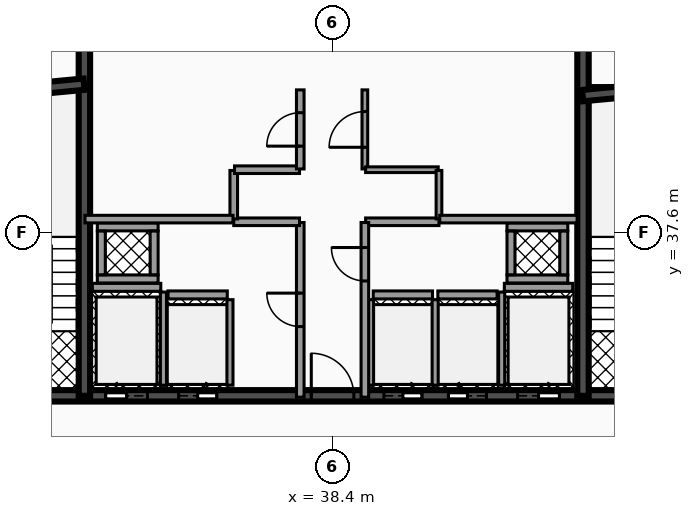
"""IFC4 building model, lengths in metres.
Left out: names, types, materials, properties, quantities, classifications, styles, units other than length and angle.
Written with IfcOpenShell. Run it as: python <this file> out.ifc"""

import sys

from ifc_helpers import new_model, si_unit, direction, frame, frame_2d, origin, place, context, subcontext, project, spatial, rectangle, extrude, element, fill, save


model = new_model("IFC4")
c1 = context("Model", 3, precision=1e-05, world=origin(), true_north=direction((0.0, 1.0)))
c2 = subcontext(c1, "Body", "Model", "MODEL_VIEW")
j1 = project(units=[si_unit("LENGTHUNIT", "METRE"), si_unit("PLANEANGLEUNIT", "RADIAN")], contexts=[c1])
p1 = place(None, origin())
s1 = spatial("IfcSite", under=j1, at=p1, CompositionType="ELEMENT")
p2 = place(p1, origin())
s2 = spatial("IfcBuilding", under=s1, at=p2, CompositionType="ELEMENT")
p3 = place(p2, frame((0.0, 0.0, 229.16)))
s3 = spatial("IfcBuildingStorey", under=s2, at=p3, CompositionType="ELEMENT", Elevation=229.16)
p4 = place(p3, frame((28.5, 33.3, 0.0), z_axis=(0.0, 0.0, 1.0), x_axis=(1.0, 0.0, 0.0)))
e1 = element("IfcWall", 1, at=p4, inside=s3, PredefinedType="SHEAR", context=c2, shape_type="SweptSolid", body=[
    extrude(rectangle(XDim=19.86, YDim=0.3, at=frame_2d((9.93, 0.0))), origin(), (0.0, 0.0, 1.0), 3.18),
])
p5 = place(p4, frame((3.93, 0.0, 0.0)))
e2 = element("IfcOpeningElement", 2, at=p5, cuts=e1, PredefinedType="OPENING", context=c2, shape_type="SweptSolid", body=[
    extrude(rectangle(XDim=1.1, YDim=2.15, at=frame_2d((0.55, 1.075))), frame((0.0, 0.16, 0.0), z_axis=(0.0, -1.0, 0.0), x_axis=(1.0, 0.0, 0.0)), (0.0, 0.0, 1.0), 0.32),
])
p6 = place(p4, frame((14.77, 0.0, 0.0)))
e3 = element("IfcOpeningElement", 3, at=p6, cuts=e1, PredefinedType="OPENING", context=c2, shape_type="SweptSolid", body=[
    extrude(rectangle(XDim=1.1, YDim=2.15, at=frame_2d((0.55, 1.075))), frame((0.0, 0.16, 0.0), z_axis=(0.0, -1.0, 0.0), x_axis=(1.0, 0.0, 0.0)), (0.0, 0.0, 1.0), 0.32),
])
p7 = place(p4, frame((11.25, 0.0, 0.0)))
e4 = element("IfcOpeningElement", 4, at=p7, cuts=e1, PredefinedType="OPENING", context=c2, shape_type="SweptSolid", body=[
    extrude(rectangle(XDim=1.0, YDim=2.1, at=frame_2d((0.5, 1.05))), frame((0.0, 0.16, 0.0), z_axis=(0.0, -1.0, 0.0), x_axis=(1.0, 0.0, 0.0)), (0.0, 0.0, 1.0), 0.32),
])
p8 = place(p4, frame((12.95, 0.0, 0.0)))
e5 = element("IfcOpeningElement", 5, at=p8, cuts=e1, PredefinedType="OPENING", context=c2, shape_type="SweptSolid", body=[
    extrude(rectangle(XDim=1.0, YDim=2.1, at=frame_2d((0.5, 1.05))), frame((0.0, 0.16, 0.0), z_axis=(0.0, -1.0, 0.0), x_axis=(1.0, 0.0, 0.0)), (0.0, 0.0, 1.0), 0.32),
])
p9 = place(p4, frame((5.85, 0.0, 0.0)))
e6 = element("IfcOpeningElement", 6, at=p9, cuts=e1, PredefinedType="OPENING", context=c2, shape_type="SweptSolid", body=[
    extrude(rectangle(XDim=1.0, YDim=2.1, at=frame_2d((0.5, 1.05))), frame((0.0, 0.16, 0.0), z_axis=(0.0, -1.0, 0.0), x_axis=(1.0, 0.0, 0.0)), (0.0, 0.0, 1.0), 0.32),
])
p10 = place(p4, frame((1.21, 0.0, 0.0)))
e7 = element("IfcOpeningElement", 7, at=p10, cuts=e1, PredefinedType="OPENING", context=c2, shape_type="SweptSolid", body=[
    extrude(rectangle(XDim=1.1, YDim=2.2, at=frame_2d((0.55, 1.1))), frame((0.0, 0.16, 0.0), z_axis=(0.0, -1.0, 0.0), x_axis=(1.0, 0.0, 0.0)), (0.0, 0.0, 1.0), 0.32),
])
p11 = place(p4, frame((9.34, 0.0, 0.0)))
e8 = element("IfcOpeningElement", 8, at=p11, cuts=e1, PredefinedType="OPENING", context=c2, shape_type="SweptSolid", body=[
    extrude(rectangle(XDim=1.12, YDim=2.05, at=frame_2d((0.56, 1.025))), frame((0.0, 0.16, 0.0), z_axis=(0.0, -1.0, 0.0), x_axis=(1.0, 0.0, 0.0)), (0.0, 0.0, 1.0), 0.32),
])
p12 = place(p4, frame((17.55, 0.0, 0.0)))
e9 = element("IfcOpeningElement", 9, at=p12, cuts=e1, PredefinedType="OPENING", context=c2, shape_type="SweptSolid", body=[
    extrude(rectangle(XDim=1.1, YDim=2.2, at=frame_2d((0.55, 1.1))), frame((0.0, 0.16, 0.0), z_axis=(0.0, -1.0, 0.0), x_axis=(1.0, 0.0, 0.0)), (0.0, 0.0, 1.0), 0.32),
])
for number, where, z_axis, x_axis in (
    (10, (31.87, 33.3, 0.0), (0.0, 0.0, 1.0), (0.0, 1.0, 0.0)),
    (11, (44.99, 33.3, 0.0), (0.0, 0.0, 1.0), (0.0, 1.0, 0.0)),
):
    element("IfcWall", number, at=place(p3, frame(where, z_axis=z_axis, x_axis=x_axis)), inside=s3, PredefinedType="SHEAR", context=c2, shape_type="SweptSolid", body=[
        extrude(rectangle(XDim=10.1, YDim=0.3, at=frame_2d((5.05, 0.0))), origin(), (0.0, 0.0, 1.0), 3.18),
    ])
p13 = place(p3, frame((28.64, 41.2, 0.0), z_axis=(0.0, 0.0, 1.0), x_axis=(0.995687118776, 0.092774789157, 0.0)))
e12 = element("IfcWall", 12, at=p13, inside=s3, PredefinedType="SHEAR", context=c2, shape_type="SweptSolid", body=[
    extrude(rectangle(XDim=3.234, YDim=0.3, at=frame_2d((1.617, 0.0))), origin(), (0.0, 0.0, 1.0), 3.18),
])
p14 = place(p3, frame((44.98, 41.2, 0.0), z_axis=(0.0, 0.0, 1.0), x_axis=(0.995686468965, 0.09278176286, 0.0)))
e13 = element("IfcWall", 13, at=p14, inside=s3, PredefinedType="SHEAR", context=c2, shape_type="SweptSolid", body=[
    extrude(rectangle(XDim=3.234, YDim=0.3, at=frame_2d((1.617, 0.0))), origin(), (0.0, 0.0, 1.0), 3.18),
])
p15 = place(p3, frame((32.08, 36.155, 0.0), z_axis=(0.0, 0.0, 1.0), x_axis=(1.0, 0.0, 0.0)))
e14 = element("IfcWall", 14, at=p15, inside=s3, PredefinedType="SOLIDWALL", context=c2, shape_type="SweptSolid", body=[
    extrude(rectangle(XDim=1.8, YDim=0.21, at=frame_2d((0.9, 0.0))), origin(), (0.0, 0.0, 1.0), 3.18),
])
p16 = place(p3, frame((33.95, 33.58, 0.0), z_axis=(0.0, 0.0, 1.0), x_axis=(0.0, 1.0, 0.0)))
e15 = element("IfcWall", 15, at=p16, inside=s3, PredefinedType="SOLIDWALL", context=c2, shape_type="SweptSolid", body=[
    extrude(rectangle(XDim=2.45, YDim=0.16, at=frame_2d((1.225, 0.0))), origin(), (0.0, 0.0, 1.0), 3.18),
])
p17 = place(p3, frame((42.92, 36.155, 0.0), z_axis=(0.0, 0.0, 1.0), x_axis=(1.0, 0.0, 0.0)))
e16 = element("IfcWall", 16, at=p17, inside=s3, PredefinedType="SOLIDWALL", context=c2, shape_type="SweptSolid", body=[
    extrude(rectangle(XDim=1.8, YDim=0.21, at=frame_2d((0.9, 0.0))), origin(), (0.0, 0.0, 1.0), 3.18),
])
p18 = place(p3, frame((42.85, 33.58, 0.0), z_axis=(0.0, 0.0, 1.0), x_axis=(0.0, 1.0, 0.0)))
e17 = element("IfcWall", 17, at=p18, inside=s3, PredefinedType="SOLIDWALL", context=c2, shape_type="SweptSolid", body=[
    extrude(rectangle(XDim=2.45, YDim=0.16, at=frame_2d((1.225, 0.0))), origin(), (0.0, 0.0, 1.0), 3.18),
])
p19 = place(p3, frame((39.47, 35.955, 0.0), z_axis=(0.0, 0.0, 1.0), x_axis=(1.0, 0.0, 0.0)))
e18 = element("IfcWall", 18, at=p19, inside=s3, PredefinedType="SOLIDWALL", context=c2, shape_type="SweptSolid", body=[
    extrude(rectangle(XDim=1.56, YDim=0.21, at=frame_2d((0.78, 0.0))), origin(), (0.0, 0.0, 1.0), 3.18),
])
for number, where, z_axis, x_axis in (
    (19, (39.4, 33.58, 0.0), (0.0, 0.0, 1.0), (0.0, 1.0, 0.0)),
    (20, (41.1, 33.58, 0.0), (0.0, 0.0, 1.0), (0.0, 1.0, 0.0)),
):
    element("IfcWall", number, at=place(p3, frame(where, z_axis=z_axis, x_axis=x_axis)), inside=s3, PredefinedType="SOLIDWALL", context=c2, shape_type="SweptSolid", body=[
        extrude(rectangle(XDim=2.25, YDim=0.16, at=frame_2d((1.125, 0.0))), origin(), (0.0, 0.0, 1.0), 3.18),
    ])
p20 = place(p3, frame((41.17, 35.955, 0.0), z_axis=(0.0, 0.0, 1.0), x_axis=(1.0, 0.0, 0.0)))
e21 = element("IfcWall", 21, at=p20, inside=s3, PredefinedType="SOLIDWALL", context=c2, shape_type="SweptSolid", body=[
    extrude(rectangle(XDim=1.56, YDim=0.21, at=frame_2d((0.78, 0.0))), origin(), (0.0, 0.0, 1.0), 3.18),
])
p21 = place(p3, frame((34.07, 35.955, 0.0), z_axis=(0.0, 0.0, 1.0), x_axis=(1.0, 0.0, 0.0)))
e22 = element("IfcWall", 22, at=p21, inside=s3, PredefinedType="SOLIDWALL", context=c2, shape_type="SweptSolid", body=[
    extrude(rectangle(XDim=1.56, YDim=0.21, at=frame_2d((0.78, 0.0))), origin(), (0.0, 0.0, 1.0), 3.18),
])
p22 = place(p3, frame((35.7, 33.58, 0.0), z_axis=(0.0, 0.0, 1.0), x_axis=(0.0, 1.0, 0.0)))
e23 = element("IfcWall", 23, at=p22, inside=s3, PredefinedType="SOLIDWALL", context=c2, shape_type="SweptSolid", body=[
    extrude(rectangle(XDim=2.25, YDim=0.16, at=frame_2d((1.125, 0.0))), origin(), (0.0, 0.0, 1.0), 3.18),
])
for number, where, z_axis, x_axis in (
    (24, (32.21, 36.375, 0.0), (0.0, 0.0, 1.0), (1.0, 0.0, 0.0)),
    (25, (32.21, 37.745, 0.0), (0.0, 0.0, 1.0), (1.0, 0.0, 0.0)),
):
    element("IfcWall", number, at=place(p3, frame(where, z_axis=z_axis, x_axis=x_axis)), inside=s3, PredefinedType="SOLIDWALL", context=c2, shape_type="SweptSolid", body=[
        extrude(rectangle(XDim=1.6, YDim=0.21, at=frame_2d((0.8, 0.0))), origin(), (0.0, 0.0, 1.0), 3.18),
    ])
for number, where, z_axis, x_axis in (
    (26, (32.315, 36.485, 0.0), (0.0, 0.0, 1.0), (0.0, 1.0, 0.0)),
    (27, (33.705, 36.485, 0.0), (0.0, 0.0, 1.0), (0.0, 1.0, 0.0)),
):
    element("IfcWall", number, at=place(p3, frame(where, z_axis=z_axis, x_axis=x_axis)), inside=s3, PredefinedType="SOLIDWALL", context=c2, shape_type="SweptSolid", body=[
        extrude(rectangle(XDim=1.15, YDim=0.21, at=frame_2d((0.575, 0.0))), origin(), (0.0, 0.0, 1.0), 3.18),
    ])
for number, where, z_axis, x_axis in (
    (28, (42.99, 36.375, 0.0), (0.0, 0.0, 1.0), (1.0, 0.0, 0.0)),
    (29, (42.99, 37.745, 0.0), (0.0, 0.0, 1.0), (1.0, 0.0, 0.0)),
):
    element("IfcWall", number, at=place(p3, frame(where, z_axis=z_axis, x_axis=x_axis)), inside=s3, PredefinedType="SOLIDWALL", context=c2, shape_type="SweptSolid", body=[
        extrude(rectangle(XDim=1.6, YDim=0.21, at=frame_2d((0.8, 0.0))), origin(), (0.0, 0.0, 1.0), 3.18),
    ])
for number, where, z_axis, x_axis in (
    (30, (43.095, 36.485, 0.0), (0.0, 0.0, 1.0), (0.0, 1.0, 0.0)),
    (31, (44.485, 36.485, 0.0), (0.0, 0.0, 1.0), (0.0, 1.0, 0.0)),
):
    element("IfcWall", number, at=place(p3, frame(where, z_axis=z_axis, x_axis=x_axis)), inside=s3, PredefinedType="SOLIDWALL", context=c2, shape_type="SweptSolid", body=[
        extrude(rectangle(XDim=1.15, YDim=0.21, at=frame_2d((0.575, 0.0))), origin(), (0.0, 0.0, 1.0), 3.18),
    ])
p23 = place(p3, frame((37.55, 33.265, 0.0), z_axis=(0.0, 0.0, 1.0), x_axis=(0.0, 1.0, 0.0)))
e32 = element("IfcWall", 32, at=p23, inside=s3, PredefinedType="PARTITIONING", context=c2, shape_type="SweptSolid", body=[
    extrude(rectangle(XDim=4.595, YDim=0.2, at=frame_2d((2.298, 0.0))), origin(), (0.0, 0.0, 1.0), 2.235),
])
p24 = place(p23, frame((1.857, 0.0, 0.0)))
e33 = element("IfcOpeningElement", 33, at=p24, cuts=e32, PredefinedType="OPENING", context=c2, shape_type="SweptSolid", body=[
    extrude(rectangle(XDim=0.88, YDim=2.05, at=frame_2d((0.44, 1.025))), frame((0.0, 0.11, 0.0), z_axis=(0.0, -1.0, 0.0), x_axis=(1.0, 0.0, 0.0)), (0.0, 0.0, 1.0), 0.22),
])
p25 = place(p3, frame((35.8, 37.88, 0.0), z_axis=(0.0, 0.0, 1.0), x_axis=(1.0, 0.0, 0.0)))
e34 = element("IfcWall", 34, at=p25, inside=s3, PredefinedType="PARTITIONING", context=c2, shape_type="SweptSolid", body=[
    extrude(rectangle(XDim=1.73, YDim=0.2, at=frame_2d((0.865, 0.0))), origin(), (0.0, 0.0, 1.0), 2.235),
])
p26 = place(p3, frame((35.8, 37.955, 0.0), z_axis=(0.0, 0.0, 1.0), x_axis=(0.0, 1.0, 0.0)))
e35 = element("IfcWall", 35, at=p26, inside=s3, PredefinedType="PARTITIONING", context=c2, shape_type="SweptSolid", body=[
    extrude(rectangle(XDim=1.275, YDim=0.2, at=frame_2d((0.637, 0.0))), origin(), (0.0, 0.0, 1.0), 2.235),
])
p27 = place(p3, frame((35.82, 39.25, 0.0), z_axis=(0.0, 0.0, 1.0), x_axis=(1.0, 0.0, 0.0)))
e36 = element("IfcWall", 36, at=p27, inside=s3, PredefinedType="PARTITIONING", context=c2, shape_type="SweptSolid", body=[
    extrude(rectangle(XDim=1.71, YDim=0.2, at=frame_2d((0.855, 0.0))), origin(), (0.0, 0.0, 1.0), 2.235),
])
p28 = place(p3, frame((37.55, 39.27, 0.0), z_axis=(0.0, 0.0, 1.0), x_axis=(0.0, 1.0, 0.0)))
e37 = element("IfcWall", 37, at=p28, inside=s3, PredefinedType="PARTITIONING", context=c2, shape_type="SweptSolid", body=[
    extrude(rectangle(XDim=2.08, YDim=0.2, at=frame_2d((1.04, 0.0))), origin(), (0.0, 0.0, 1.0), 2.235),
])
p29 = place(p28, frame((0.6, 0.0, 0.0)))
e38 = element("IfcOpeningElement", 38, at=p29, cuts=e37, PredefinedType="OPENING", context=c2, shape_type="SweptSolid", body=[
    extrude(rectangle(XDim=0.88, YDim=2.05, at=frame_2d((0.44, 1.025))), frame((0.0, 0.11, 0.0), z_axis=(0.0, -1.0, 0.0), x_axis=(1.0, 0.0, 0.0)), (0.0, 0.0, 1.0), 0.22),
])
p30 = place(p3, frame((39.27, 37.88, 0.0), z_axis=(0.0, 0.0, 1.0), x_axis=(1.0, 0.0, 0.0)))
e39 = element("IfcWall", 39, at=p30, inside=s3, PredefinedType="PARTITIONING", context=c2, shape_type="SweptSolid", body=[
    extrude(rectangle(XDim=1.93, YDim=0.2, at=frame_2d((0.965, 0.0))), origin(), (0.0, 0.0, 1.0), 2.235),
])
p31 = place(p3, frame((39.25, 33.265, 0.0), z_axis=(0.0, 0.0, 1.0), x_axis=(0.0, 1.0, 0.0)))
e40 = element("IfcWall", 40, at=p31, inside=s3, PredefinedType="PARTITIONING", context=c2, shape_type="SweptSolid", body=[
    extrude(rectangle(XDim=4.595, YDim=0.2, at=frame_2d((2.298, 0.0))), origin(), (0.0, 0.0, 1.0), 2.235),
])
p32 = place(p31, frame((3.058, 0.0, 0.0)))
e41 = element("IfcOpeningElement", 41, at=p32, cuts=e40, PredefinedType="OPENING", context=c2, shape_type="SweptSolid", body=[
    extrude(rectangle(XDim=0.88, YDim=2.05, at=frame_2d((0.44, 1.025))), frame((0.0, 0.11, 0.0), z_axis=(0.0, -1.0, 0.0), x_axis=(1.0, 0.0, 0.0)), (0.0, 0.0, 1.0), 0.22),
])
p33 = place(p3, frame((39.25, 39.27, 0.0), z_axis=(0.0, 0.0, 1.0), x_axis=(0.0, 1.0, 0.0)))
e42 = element("IfcWall", 42, at=p33, inside=s3, PredefinedType="PARTITIONING", context=c2, shape_type="SweptSolid", body=[
    extrude(rectangle(XDim=2.08, YDim=0.15, at=frame_2d((1.04, 0.0))), origin(), (0.0, 0.0, 1.0), 2.235),
])
p34 = place(p33, frame((0.57, 0.0, 0.0)))
e43 = element("IfcOpeningElement", 43, at=p34, cuts=e42, PredefinedType="OPENING", context=c2, shape_type="SweptSolid", body=[
    extrude(rectangle(XDim=0.94, YDim=2.05, at=frame_2d((0.47, 1.025))), frame((0.0, 0.085, 0.0), z_axis=(0.0, -1.0, 0.0), x_axis=(1.0, 0.0, 0.0)), (0.0, 0.0, 1.0), 0.17),
])
p35 = place(p3, frame((39.27, 39.25, 0.0), z_axis=(0.0, 0.0, 1.0), x_axis=(1.0, 0.0, 0.0)))
e44 = element("IfcWall", 44, at=p35, inside=s3, PredefinedType="PARTITIONING", context=c2, shape_type="SweptSolid", body=[
    extrude(rectangle(XDim=1.91, YDim=0.15, at=frame_2d((0.955, 0.0))), origin(), (0.0, 0.0, 1.0), 2.235),
])
p36 = place(p3, frame((41.2, 37.955, 0.0), z_axis=(0.0, 0.0, 1.0), x_axis=(0.0, 1.0, 0.0)))
e45 = element("IfcWall", 45, at=p36, inside=s3, PredefinedType="PARTITIONING", context=c2, shape_type="SweptSolid", body=[
    extrude(rectangle(XDim=1.275, YDim=0.15, at=frame_2d((0.637, 0.0))), origin(), (0.0, 0.0, 1.0), 2.235),
])
p37 = place(p3, frame((31.885, 37.95, 0.0), z_axis=(0.0, 0.0, 1.0), x_axis=(1.0, 0.0, 0.0)))
e46 = element("IfcWall", 46, at=p37, inside=s3, PredefinedType="PARTITIONING", context=c2, shape_type="SweptSolid", body=[
    extrude(rectangle(XDim=3.895, YDim=0.2, at=frame_2d((1.948, 0.0))), origin(), (0.0, 0.0, 1.0), 2.235),
])
p38 = place(p3, frame((41.22, 37.95, 0.0), z_axis=(0.0, 0.0, 1.0), x_axis=(1.0, 0.0, 0.0)))
e47 = element("IfcWall", 47, at=p38, inside=s3, PredefinedType="PARTITIONING", context=c2, shape_type="SweptSolid", body=[
    extrude(rectangle(XDim=3.615, YDim=0.2, at=frame_2d((1.808, 0.0))), origin(), (0.0, 0.0, 1.0), 2.235),
])
p39 = place(p5, origin())
e48 = element("IfcDoor", 48, at=p39, inside=s3, OperationType="SLIDING_TO_LEFT", PredefinedType="DOOR", context=c2, shape_type="SweptSolid", body=[
    extrude(rectangle(XDim=1.1, YDim=2.15, at=frame_2d((0.55, 1.075))), frame((0.0, 0.025, 0.0), z_axis=(0.0, -1.0, 0.0), x_axis=(1.0, 0.0, 0.0)), (0.0, 0.0, 1.0), 0.05),
])
fill(e2, e48)
p40 = place(p6, origin())
e49 = element("IfcDoor", 49, at=p40, inside=s3, OperationType="SLIDING_TO_RIGHT", PredefinedType="DOOR", context=c2, shape_type="SweptSolid", body=[
    extrude(rectangle(XDim=1.1, YDim=2.15, at=frame_2d((0.55, 1.075))), frame((0.0, 0.025, 0.0), z_axis=(0.0, -1.0, 0.0), x_axis=(1.0, 0.0, 0.0)), (0.0, 0.0, 1.0), 0.05),
])
fill(e3, e49)
p41 = place(p7, origin())
e50 = element("IfcDoor", 50, at=p41, inside=s3, OperationType="SLIDING_TO_RIGHT", PredefinedType="DOOR", context=c2, shape_type="SweptSolid", body=[
    extrude(rectangle(XDim=1.0, YDim=2.1, at=frame_2d((0.5, 1.05))), frame((0.0, 0.025, 0.0), z_axis=(0.0, -1.0, 0.0), x_axis=(1.0, 0.0, 0.0)), (0.0, 0.0, 1.0), 0.05),
])
fill(e4, e50)
p42 = place(p8, origin())
e51 = element("IfcDoor", 51, at=p42, inside=s3, OperationType="SLIDING_TO_LEFT", PredefinedType="DOOR", context=c2, shape_type="SweptSolid", body=[
    extrude(rectangle(XDim=1.0, YDim=2.1, at=frame_2d((0.5, 1.05))), frame((0.0, 0.025, 0.0), z_axis=(0.0, -1.0, 0.0), x_axis=(1.0, 0.0, 0.0)), (0.0, 0.0, 1.0), 0.05),
])
fill(e5, e51)
p43 = place(p9, origin())
e52 = element("IfcDoor", 52, at=p43, inside=s3, OperationType="SLIDING_TO_RIGHT", PredefinedType="DOOR", context=c2, shape_type="SweptSolid", body=[
    extrude(rectangle(XDim=1.0, YDim=2.1, at=frame_2d((0.5, 1.05))), frame((0.0, 0.025, 0.0), z_axis=(0.0, -1.0, 0.0), x_axis=(1.0, 0.0, 0.0)), (0.0, 0.0, 1.0), 0.05),
])
fill(e6, e52)
p44 = place(p11, origin())
e53 = element("IfcDoor", 53, at=p44, inside=s3, OperationType="SINGLE_SWING_LEFT", PredefinedType="DOOR", context=c2, shape_type="SweptSolid", body=[
    extrude(rectangle(XDim=1.12, YDim=2.05, at=frame_2d((0.56, 1.025))), frame((0.0, 0.025, 0.0), z_axis=(0.0, -1.0, 0.0), x_axis=(1.0, 0.0, 0.0)), (0.0, 0.0, 1.0), 0.05),
])
fill(e8, e53)
p45 = place(p24, origin())
e54 = element("IfcDoor", 54, at=p45, inside=s3, OperationType="SINGLE_SWING_RIGHT", PredefinedType="DOOR", context=c2, shape_type="SweptSolid", body=[
    extrude(rectangle(XDim=0.88, YDim=2.05, at=frame_2d((0.44, 1.025))), frame((0.0, 0.025, 0.0), z_axis=(0.0, -1.0, 0.0), x_axis=(1.0, 0.0, 0.0)), (0.0, 0.0, 1.0), 0.05),
])
fill(e33, e54)
p46 = place(p29, origin())
e55 = element("IfcDoor", 55, at=p46, inside=s3, OperationType="SINGLE_SWING_LEFT", PredefinedType="DOOR", context=c2, shape_type="SweptSolid", body=[
    extrude(rectangle(XDim=0.88, YDim=2.05, at=frame_2d((0.44, 1.025))), frame((0.0, 0.025, 0.0), z_axis=(0.0, -1.0, 0.0), x_axis=(1.0, 0.0, 0.0)), (0.0, 0.0, 1.0), 0.05),
])
fill(e38, e55)
p47 = place(p32, origin())
e56 = element("IfcDoor", 56, at=p47, inside=s3, OperationType="SINGLE_SWING_RIGHT", PredefinedType="DOOR", context=c2, shape_type="SweptSolid", body=[
    extrude(rectangle(XDim=0.88, YDim=2.05, at=frame_2d((0.44, 1.025))), frame((0.0, 0.025, 0.0), z_axis=(0.0, -1.0, 0.0), x_axis=(1.0, 0.0, 0.0)), (0.0, 0.0, 1.0), 0.05),
])
fill(e41, e56)
p48 = place(p34, origin())
e57 = element("IfcDoor", 57, at=p48, inside=s3, OperationType="SINGLE_SWING_LEFT", PredefinedType="DOOR", context=c2, shape_type="SweptSolid", body=[
    extrude(rectangle(XDim=0.94, YDim=2.05, at=frame_2d((0.47, 1.025))), frame((0.0, 0.025, 0.0), z_axis=(0.0, -1.0, 0.0), x_axis=(1.0, 0.0, 0.0)), (0.0, 0.0, 1.0), 0.05),
])
fill(e43, e57)
save(model, sys.argv[1])
